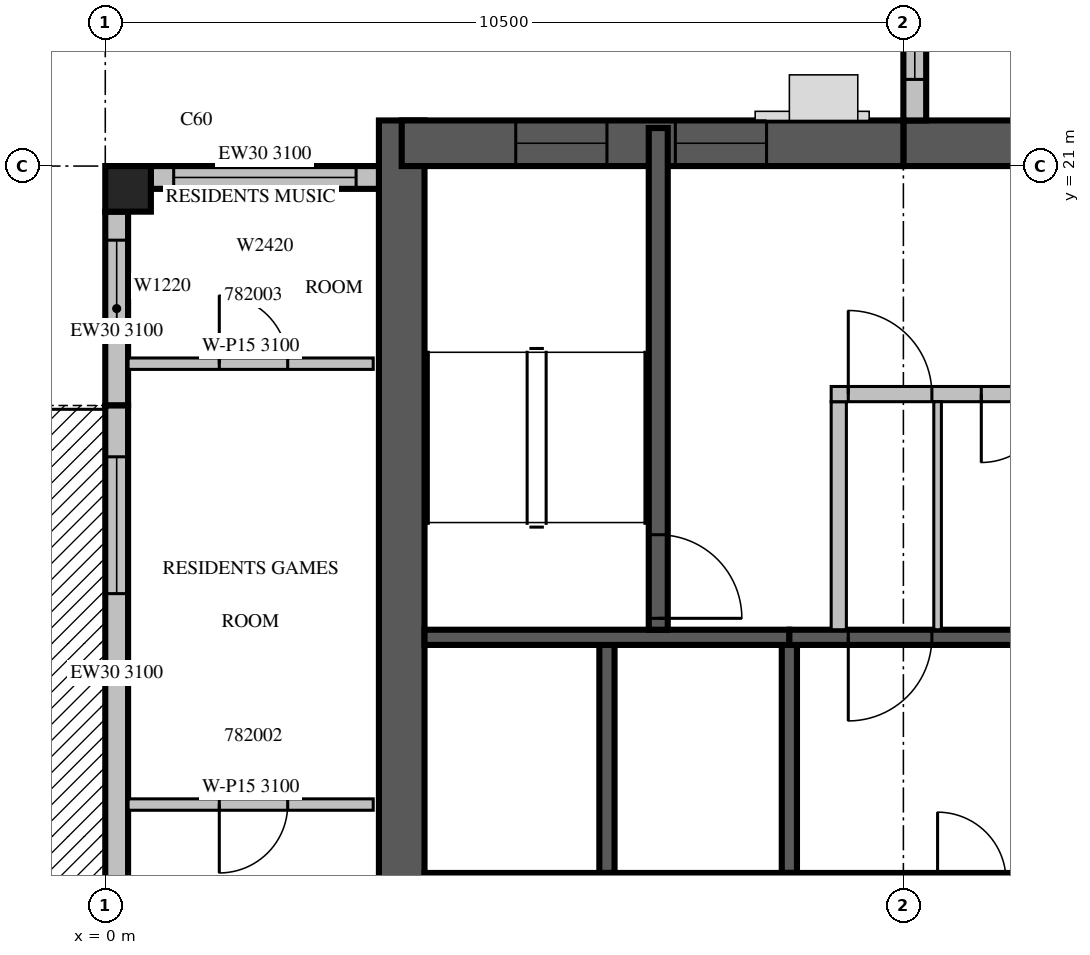
"""IFC4 building model, lengths in metres.
Left out: names, types, materials, properties, quantities, classifications, styles, units other than length and angle.
Written with IfcOpenShell. Run it as: python <this file> out.ifc"""

import sys

from ifc_helpers import new_model, si_unit, direction, frame, frame_2d, origin, origin_2d, place, context, subcontext, project, spatial, rectangle, extrude, source, transform, mapped, element, fill, save


model = new_model("IFC4")
c1 = context("Model", 3, precision=1e-05, world=origin(), true_north=direction((0.0, 1.0)))
c2 = subcontext(c1, "Body", "Model", "MODEL_VIEW")
j1 = project(units=[si_unit("LENGTHUNIT", "METRE"), si_unit("PLANEANGLEUNIT", "RADIAN")], contexts=[c1])
p1 = place(None, origin())
s1 = spatial("IfcSite", under=j1, at=p1, CompositionType="ELEMENT")
p2 = place(p1, origin())
s2 = spatial("IfcBuilding", under=s1, at=p2, CompositionType="ELEMENT")
p3 = place(p2, frame((0.0, 0.0, 347.5)))
s3 = spatial("IfcBuildingStorey", under=s2, at=p3, CompositionType="ELEMENT", Elevation=347.5)
m1 = source(origin(), c2, "Body", "SweptSolid", [
    extrude(rectangle(XDim=0.6, YDim=0.6, at=origin_2d()), origin(), (0.0, 0.0, 1.0), 3.5),
])
p4 = place(p3, frame((0.3, 20.7, 0.0), z_axis=(0.0, 0.0, 1.0), x_axis=(1.0, 0.0, 0.0)))
e1 = element("IfcColumn", 1, at=p4, inside=s3, PredefinedType="COLUMN", context=c2, shape_type="MappedRepresentation", body=[
    mapped(m1, transform((0.0, 0.0, 0.0), scale=1.0)),
])
m2 = source(origin(), c2, "Body", "SweptSolid", [
    extrude(rectangle(XDim=17.4, YDim=0.6, at=frame_2d((8.7, 0.0))), origin(), (0.0, 0.0, 1.0), 3.5),
])
p5 = place(p3, frame((3.9, 4.2, 0.0), z_axis=(0.0, 0.0, 1.0), x_axis=(0.0, 1.0, 0.0)))
e2 = element("IfcWall", 2, at=p5, inside=s3, PredefinedType="SHEAR", context=c2, shape_type="MappedRepresentation", body=[
    mapped(m2, transform((0.0, 0.0, 0.0), scale=1.0)),
])
m3 = source(origin(), c2, "Body", "SweptSolid", [
    extrude(rectangle(XDim=2.2, YDim=2.1, at=frame_2d((1.1, 1.05))), frame((0.0, 0.31, 0.0), z_axis=(0.0, -1.0, 0.0), x_axis=(1.0, 0.0, 0.0)), (0.0, 0.0, 1.0), 0.62),
])
p6 = place(p5, frame((4.2, 0.0, 0.0)))
e3 = element("IfcOpeningElement", 3, at=p6, cuts=e2, PredefinedType="OPENING", context=c2, shape_type="MappedRepresentation", body=[
    mapped(m3, transform((0.0, 0.0, 0.0), scale=1.0)),
])
m4 = source(origin(), c2, "Body", "SweptSolid", [
    extrude(rectangle(XDim=11.1, YDim=0.6, at=frame_2d((5.55, 0.0))), origin(), (0.0, 0.0, 1.0), 3.5),
])
p7 = place(p3, frame((10.5, 21.3, 0.0), z_axis=(0.0, 0.0, 1.0), x_axis=(1.0, 0.0, 0.0)))
e4 = element("IfcWall", 4, at=p7, inside=s3, PredefinedType="SHEAR", context=c2, shape_type="MappedRepresentation", body=[
    mapped(m4, transform((0.0, 0.0, 0.0), scale=1.0)),
])
m5 = source(origin(), c2, "Body", "SweptSolid", [
    extrude(rectangle(XDim=1.2, YDim=2.1, at=frame_2d((0.6, 1.05))), frame((0.0, 0.31, 0.0), z_axis=(0.0, -1.0, 0.0), x_axis=(1.0, 0.0, 0.0)), (0.0, 0.0, 1.0), 0.62),
])
p8 = place(p7, frame((8.7, 0.0, 0.0)))
e5 = element("IfcOpeningElement", 5, at=p8, cuts=e4, PredefinedType="OPENING", context=c2, shape_type="MappedRepresentation", body=[
    mapped(m5, transform((0.0, 0.0, 0.0), scale=1.0)),
])
m6 = source(origin(), c2, "Body", "SweptSolid", [
    extrude(rectangle(XDim=6.6, YDim=0.6, at=frame_2d((3.3, 0.0))), origin(), (0.0, 0.0, 1.0), 3.5),
])
p9 = place(p3, frame((3.9, 21.3, 0.0), z_axis=(0.0, 0.0, 1.0), x_axis=(1.0, 0.0, 0.0)))
e6 = element("IfcWall", 6, at=p9, inside=s3, PredefinedType="SHEAR", context=c2, shape_type="MappedRepresentation", body=[
    mapped(m6, transform((0.0, 0.0, 0.0), scale=1.0)),
])
m7 = source(origin(), c2, "Body", "SweptSolid", [
    extrude(rectangle(XDim=1.2, YDim=2.4, at=frame_2d((0.6, 1.2))), frame((0.0, 0.31, 0.0), z_axis=(0.0, -1.0, 0.0), x_axis=(1.0, 0.0, 0.0)), (0.0, 0.0, 1.0), 0.62),
])
p10 = place(p9, frame((1.5, 0.0, 0.6)))
e7 = element("IfcOpeningElement", 7, at=p10, cuts=e6, PredefinedType="OPENING", context=c2, shape_type="MappedRepresentation", body=[
    mapped(m7, transform((0.0, 0.0, 0.0), scale=1.0)),
])
p11 = place(p9, frame((3.6, 0.0, 0.6)))
e8 = element("IfcOpeningElement", 8, at=p11, cuts=e6, PredefinedType="OPENING", context=c2, shape_type="MappedRepresentation", body=[
    mapped(m7, transform((0.0, 0.0, 0.0), scale=1.0)),
])
m8 = source(origin(), c2, "Body", "SweptSolid", [
    extrude(rectangle(XDim=7.5, YDim=0.3, at=frame_2d((3.75, 0.0))), origin(), (0.0, 0.0, 1.0), 3.1),
])
p12 = place(p3, frame((10.65, 29.1, 0.0), z_axis=(0.0, 0.0, 1.0), x_axis=(0.0, -1.0, 0.0)))
e9 = element("IfcWall", 9, at=p12, inside=s3, PredefinedType="STANDARD", context=c2, shape_type="MappedRepresentation", body=[
    mapped(m8, transform((0.0, 0.0, 0.0), scale=1.0)),
])
m9 = source(origin(), c2, "Body", "SweptSolid", [
    extrude(rectangle(XDim=3.6, YDim=2.0, at=frame_2d((1.8, 1.0))), frame((0.0, 0.16, 0.0), z_axis=(0.0, -1.0, 0.0), x_axis=(1.0, 0.0, 0.0)), (0.0, 0.0, 1.0), 0.32),
])
p13 = place(p12, frame((3.36, 0.0, 0.6)))
e10 = element("IfcOpeningElement", 10, at=p13, cuts=e9, PredefinedType="OPENING", context=c2, shape_type="MappedRepresentation", body=[
    mapped(m9, transform((0.0, 0.0, 0.0), scale=1.0)),
])
m10 = source(origin(), c2, "Body", "SweptSolid", [
    extrude(rectangle(XDim=2.4, YDim=2.0, at=frame_2d((1.2, 1.0))), frame((0.0, 0.16, 0.0), z_axis=(0.0, -1.0, 0.0), x_axis=(1.0, 0.0, 0.0)), (0.0, 0.0, 1.0), 0.32),
])
p14 = place(p12, frame((0.48, 0.0, 0.6)))
e11 = element("IfcOpeningElement", 11, at=p14, cuts=e9, PredefinedType="OPENING", context=c2, shape_type="MappedRepresentation", body=[
    mapped(m10, transform((0.0, 0.0, 0.0), scale=1.0)),
])
m11 = source(origin(), c2, "Body", "SweptSolid", [
    extrude(rectangle(XDim=3.0, YDim=0.3, at=frame_2d((1.5, 0.0))), origin(), (0.0, 0.0, 1.0), 3.1),
])
p15 = place(p3, frame((3.6, 20.85, 0.0), z_axis=(0.0, 0.0, 1.0), x_axis=(-1.0, 0.0, 0.0)))
e12 = element("IfcWall", 12, at=p15, inside=s3, PredefinedType="STANDARD", context=c2, shape_type="MappedRepresentation", body=[
    mapped(m11, transform((0.0, 0.0, 0.0), scale=1.0)),
])
p16 = place(p15, frame((0.3, 0.0, 0.6)))
e13 = element("IfcOpeningElement", 13, at=p16, cuts=e12, PredefinedType="OPENING", context=c2, shape_type="MappedRepresentation", body=[
    mapped(m10, transform((0.0, 0.0, 0.0), scale=1.0)),
])
m12 = source(origin(), c2, "Body", "SweptSolid", [
    extrude(rectangle(XDim=2.55, YDim=0.3, at=frame_2d((1.275, 0.0))), origin(), (0.0, 0.0, 1.0), 3.1),
])
p17 = place(p3, frame((0.15, 20.4, 0.0), z_axis=(0.0, 0.0, 1.0), x_axis=(0.0, -1.0, 0.0)))
e14 = element("IfcWall", 14, at=p17, inside=s3, PredefinedType="STANDARD", context=c2, shape_type="MappedRepresentation", body=[
    mapped(m12, transform((0.0, 0.0, 0.0), scale=1.0)),
])
m13 = source(origin(), c2, "Body", "SweptSolid", [
    extrude(rectangle(XDim=1.2, YDim=2.0, at=frame_2d((0.6, 1.0))), frame((0.0, 0.16, 0.0), z_axis=(0.0, -1.0, 0.0), x_axis=(1.0, 0.0, 0.0)), (0.0, 0.0, 1.0), 0.32),
])
p18 = place(p17, frame((0.375, 0.0, 0.6)))
e15 = element("IfcOpeningElement", 15, at=p18, cuts=e14, PredefinedType="OPENING", context=c2, shape_type="MappedRepresentation", body=[
    mapped(m13, transform((0.0, 0.0, 0.0), scale=1.0)),
])
m14 = source(origin(), c2, "Body", "SweptSolid", [
    extrude(rectangle(XDim=7.05, YDim=0.3, at=frame_2d((3.525, 0.0))), origin(), (0.0, 0.0, 1.0), 3.1),
])
p19 = place(p3, frame((0.15, 17.85, 0.0), z_axis=(0.0, 0.0, 1.0), x_axis=(0.0, -1.0, 0.0)))
e16 = element("IfcWall", 16, at=p19, inside=s3, PredefinedType="STANDARD", context=c2, shape_type="MappedRepresentation", body=[
    mapped(m14, transform((0.0, 0.0, 0.0), scale=1.0)),
])
m15 = source(origin(), c2, "Body", "SweptSolid", [
    extrude(rectangle(XDim=1.8, YDim=2.4, at=frame_2d((0.9, 1.2))), frame((0.0, 0.16, 0.0), z_axis=(0.0, -1.0, 0.0), x_axis=(1.0, 0.0, 0.0)), (0.0, 0.0, 1.0), 0.32),
])
p20 = place(p19, frame((0.675, 0.0, 0.0)))
e17 = element("IfcOpeningElement", 17, at=p20, cuts=e16, PredefinedType="OPENING", context=c2, shape_type="MappedRepresentation", body=[
    mapped(m15, transform((0.0, 0.0, 0.0), scale=1.0)),
])
m16 = source(origin(), c2, "Body", "SweptSolid", [
    extrude(rectangle(XDim=3.0, YDim=0.2, at=frame_2d((1.5, 0.0))), origin(), (0.0, 0.0, 1.0), 3.5),
])
p21 = place(p3, frame((6.6, 11.7, 0.0), z_axis=(0.0, 0.0, 1.0), x_axis=(0.0, 1.0, 0.0)))
e18 = element("IfcWall", 18, at=p21, inside=s3, PredefinedType="SOLIDWALL", context=c2, shape_type="MappedRepresentation", body=[
    mapped(m16, transform((0.0, 0.0, 0.0), scale=1.0)),
])
m17 = source(origin(), c2, "Body", "SweptSolid", [
    extrude(rectangle(XDim=3.0, YDim=0.2, at=frame_2d((1.5, 0.0))), origin(), (0.0, 0.0, 1.0), 3.1),
])
p22 = place(p3, frame((9.0, 11.7, 0.0), z_axis=(0.0, 0.0, 1.0), x_axis=(0.0, 1.0, 0.0)))
e19 = element("IfcWall", 19, at=p22, inside=s3, PredefinedType="SOLIDWALL", context=c2, shape_type="MappedRepresentation", body=[
    mapped(m17, transform((0.0, 0.0, 0.0), scale=1.0)),
])
m18 = source(origin(), c2, "Body", "SweptSolid", [
    extrude(rectangle(XDim=4.8, YDim=0.2, at=frame_2d((2.4, 0.0))), origin(), (0.0, 0.0, 1.0), 3.5),
])
p23 = place(p3, frame((4.2, 11.6, 0.0), z_axis=(0.0, 0.0, 1.0), x_axis=(1.0, 0.0, 0.0)))
e20 = element("IfcWall", 20, at=p23, inside=s3, PredefinedType="SOLIDWALL", context=c2, shape_type="MappedRepresentation", body=[
    mapped(m18, transform((0.0, 0.0, 0.0), scale=1.0)),
])
m19 = source(origin(), c2, "Body", "SweptSolid", [
    extrude(rectangle(XDim=1.1, YDim=2.1, at=frame_2d((0.55, 1.05))), frame((0.0, 0.11, 0.0), z_axis=(0.0, -1.0, 0.0), x_axis=(1.0, 0.0, 0.0)), (0.0, 0.0, 1.0), 0.22),
])
p24 = place(p23, frame((0.65, 0.0, 0.0)))
e21 = element("IfcOpeningElement", 21, at=p24, cuts=e20, PredefinedType="OPENING", context=c2, shape_type="MappedRepresentation", body=[
    mapped(m19, transform((0.0, 0.0, 0.0), scale=1.0)),
])
p25 = place(p23, frame((3.05, 0.0, 0.0)))
e22 = element("IfcOpeningElement", 22, at=p25, cuts=e20, PredefinedType="OPENING", context=c2, shape_type="MappedRepresentation", body=[
    mapped(m19, transform((0.0, 0.0, 0.0), scale=1.0)),
])
m20 = source(origin(), c2, "Body", "SweptSolid", [
    extrude(rectangle(XDim=4.8, YDim=0.2, at=frame_2d((2.4, 0.0))), origin(), (0.0, 0.0, 1.0), 3.1),
])
p26 = place(p3, frame((9.0, 11.6, 0.0), z_axis=(0.0, 0.0, 1.0), x_axis=(1.0, 0.0, 0.0)))
e23 = element("IfcWall", 23, at=p26, inside=s3, PredefinedType="SOLIDWALL", context=c2, shape_type="MappedRepresentation", body=[
    mapped(m20, transform((0.0, 0.0, 0.0), scale=1.0)),
])
m21 = source(origin(), c2, "Body", "SweptSolid", [
    extrude(rectangle(XDim=0.9, YDim=2.1, at=frame_2d((0.45, 1.05))), frame((0.0, 0.11, 0.0), z_axis=(0.0, -1.0, 0.0), x_axis=(1.0, 0.0, 0.0)), (0.0, 0.0, 1.0), 0.22),
])
p27 = place(p26, frame((1.95, 0.0, 0.0)))
e24 = element("IfcOpeningElement", 24, at=p27, cuts=e23, PredefinedType="OPENING", context=c2, shape_type="MappedRepresentation", body=[
    mapped(m21, transform((0.0, 0.0, 0.0), scale=1.0)),
])
p28 = place(p3, frame((4.2, 14.8, 0.0), z_axis=(0.0, 0.0, 1.0), x_axis=(1.0, 0.0, 0.0)))
e25 = element("IfcWall", 25, at=p28, inside=s3, PredefinedType="SOLIDWALL", context=c2, shape_type="MappedRepresentation", body=[
    mapped(m18, transform((0.0, 0.0, 0.0), scale=1.0)),
])
p29 = place(p3, frame((9.0, 14.8, 0.0), z_axis=(0.0, 0.0, 1.0), x_axis=(1.0, 0.0, 0.0)))
e26 = element("IfcWall", 26, at=p29, inside=s3, PredefinedType="SOLIDWALL", context=c2, shape_type="MappedRepresentation", body=[
    mapped(m20, transform((0.0, 0.0, 0.0), scale=1.0)),
])
p30 = place(p29, frame((0.775, 0.0, 0.0)))
e27 = element("IfcOpeningElement", 27, at=p30, cuts=e26, PredefinedType="OPENING", context=c2, shape_type="MappedRepresentation", body=[
    mapped(m19, transform((0.0, 0.0, 0.0), scale=1.0)),
])
m22 = source(origin(), c2, "Body", "SweptSolid", [
    extrude(rectangle(XDim=6.6, YDim=0.25, at=frame_2d((3.3, 0.0))), origin(), (0.0, 0.0, 1.0), 3.1),
])
p31 = place(p3, frame((7.275, 14.9, 0.0), z_axis=(0.0, 0.0, 1.0), x_axis=(0.0, 1.0, 0.0)))
e28 = element("IfcWall", 28, at=p31, inside=s3, PredefinedType="SOLIDWALL", context=c2, shape_type="MappedRepresentation", body=[
    mapped(m22, transform((0.0, 0.0, 0.0), scale=1.0)),
])
m23 = source(origin(), c2, "Body", "SweptSolid", [
    extrude(rectangle(XDim=1.1, YDim=2.1, at=frame_2d((0.55, 1.05))), frame((0.0, 0.135, 0.0), z_axis=(0.0, -1.0, 0.0), x_axis=(1.0, 0.0, 0.0)), (0.0, 0.0, 1.0), 0.27),
])
p32 = place(p31, frame((0.15, 0.0, 0.0)))
e29 = element("IfcOpeningElement", 29, at=p32, cuts=e28, PredefinedType="OPENING", context=c2, shape_type="MappedRepresentation", body=[
    mapped(m23, transform((0.0, 0.0, 0.0), scale=1.0)),
])
m24 = source(origin(), c2, "Body", "SweptSolid", [
    extrude(rectangle(XDim=3.0, YDim=0.2, at=frame_2d((1.5, 0.0))), origin(), (0.0, 0.0, 1.0), 3.1),
])
p33 = place(p3, frame((9.65, 14.9, 0.0), z_axis=(0.0, 0.0, 1.0), x_axis=(0.0, 1.0, 0.0)))
e30 = element("IfcWall", 30, at=p33, inside=s3, PredefinedType="PARTITIONING", context=c2, shape_type="MappedRepresentation", body=[
    mapped(m24, transform((0.0, 0.0, 0.0), scale=1.0)),
])
m25 = source(origin(), c2, "Body", "SweptSolid", [
    extrude(rectangle(XDim=11.45, YDim=0.2, at=frame_2d((5.725, 0.0))), origin(), (0.0, 0.0, 1.0), 3.1),
])
p34 = place(p3, frame((9.55, 18.0, 0.0), z_axis=(0.0, 0.0, 1.0), x_axis=(1.0, 0.0, 0.0)))
e31 = element("IfcWall", 31, at=p34, inside=s3, PredefinedType="PARTITIONING", context=c2, shape_type="MappedRepresentation", body=[
    mapped(m25, transform((0.0, 0.0, 0.0), scale=1.0)),
])
p35 = place(p34, frame((0.225, 0.0, 0.0)))
e32 = element("IfcOpeningElement", 32, at=p35, cuts=e31, PredefinedType="OPENING", context=c2, shape_type="MappedRepresentation", body=[
    mapped(m19, transform((0.0, 0.0, 0.0), scale=1.0)),
])
p36 = place(p34, frame((1.975, 0.0, 0.0)))
e33 = element("IfcOpeningElement", 33, at=p36, cuts=e31, PredefinedType="OPENING", context=c2, shape_type="MappedRepresentation", body=[
    mapped(m21, transform((0.0, 0.0, 0.0), scale=1.0)),
])
p37 = place(p34, frame((7.35, 0.0, 0.0)))
e34 = element("IfcOpeningElement", 34, at=p37, cuts=e31, PredefinedType="OPENING", context=c2, shape_type="MappedRepresentation", body=[
    mapped(m19, transform((0.0, 0.0, 0.0), scale=1.0)),
])
m26 = source(origin(), c2, "Body", "SweptSolid", [
    extrude(rectangle(XDim=3.0, YDim=0.1, at=frame_2d((1.5, 0.0))), origin(), (0.0, 0.0, 1.0), 3.1),
])
p38 = place(p3, frame((10.95, 14.9, 0.0), z_axis=(0.0, 0.0, 1.0), x_axis=(0.0, 1.0, 0.0)))
e35 = element("IfcWall", 35, at=p38, inside=s3, PredefinedType="PARTITIONING", context=c2, shape_type="MappedRepresentation", body=[
    mapped(m26, transform((0.0, 0.0, 0.0), scale=1.0)),
])
m27 = source(origin(), c2, "Body", "SweptSolid", [
    extrude(rectangle(XDim=3.225, YDim=0.15, at=frame_2d((1.613, 0.0))), origin(), (0.0, 0.0, 1.0), 3.1),
])
p39 = place(p3, frame((0.3, 12.6, 0.0), z_axis=(0.0, 0.0, 1.0), x_axis=(1.0, 0.0, 0.0)))
e36 = element("IfcWall", 36, at=p39, inside=s3, PredefinedType="PARTITIONING", context=c2, shape_type="MappedRepresentation", body=[
    mapped(m27, transform((0.0, 0.0, 0.0), scale=1.0)),
])
m28 = source(origin(), c2, "Body", "SweptSolid", [
    extrude(rectangle(XDim=0.9, YDim=2.1, at=frame_2d((0.45, 1.05))), frame((0.0, 0.085, 0.0), z_axis=(0.0, -1.0, 0.0), x_axis=(1.0, 0.0, 0.0)), (0.0, 0.0, 1.0), 0.17),
])
p40 = place(p39, frame((1.2, 0.0, 0.0)))
e37 = element("IfcOpeningElement", 37, at=p40, cuts=e36, PredefinedType="OPENING", context=c2, shape_type="MappedRepresentation", body=[
    mapped(m28, transform((0.0, 0.0, 0.0), scale=1.0)),
])
p41 = place(p3, frame((0.3, 18.4, 0.0), z_axis=(0.0, 0.0, 1.0), x_axis=(1.0, 0.0, 0.0)))
e38 = element("IfcWall", 38, at=p41, inside=s3, PredefinedType="PARTITIONING", context=c2, shape_type="MappedRepresentation", body=[
    mapped(m27, transform((0.0, 0.0, 0.0), scale=1.0)),
])
p42 = place(p41, frame((1.2, 0.0, 0.0)))
e39 = element("IfcOpeningElement", 39, at=p42, cuts=e38, PredefinedType="OPENING", context=c2, shape_type="MappedRepresentation", body=[
    mapped(m28, transform((0.0, 0.0, 0.0), scale=1.0)),
])
m29 = source(origin(), c2, "Body", "SweptSolid", [
    extrude(rectangle(XDim=3.6, YDim=2.0, at=frame_2d((1.8, 1.0))), frame((0.0, 0.03, 0.0), z_axis=(0.0, -1.0, 0.0), x_axis=(1.0, 0.0, 0.0)), (0.0, 0.0, 1.0), 0.06),
])
p43 = place(p13, origin())
e40 = element("IfcWindow", 40, at=p43, inside=s3, PartitioningType="SINGLE_PANEL", PredefinedType="WINDOW", context=c2, shape_type="MappedRepresentation", body=[
    mapped(m29, transform((0.0, 0.0, 0.0), scale=1.0)),
])
fill(e10, e40)
m30 = source(origin(), c2, "Body", "SweptSolid", [
    extrude(rectangle(XDim=2.4, YDim=2.0, at=frame_2d((1.2, 1.0))), frame((0.0, 0.03, 0.0), z_axis=(0.0, -1.0, 0.0), x_axis=(1.0, 0.0, 0.0)), (0.0, 0.0, 1.0), 0.06),
])
p44 = place(p16, origin())
e41 = element("IfcWindow", 41, at=p44, inside=s3, PartitioningType="SINGLE_PANEL", PredefinedType="WINDOW", context=c2, shape_type="MappedRepresentation", body=[
    mapped(m30, transform((0.0, 0.0, 0.0), scale=1.0)),
])
fill(e13, e41)
m31 = source(origin(), c2, "Body", "SweptSolid", [
    extrude(rectangle(XDim=1.2, YDim=2.0, at=frame_2d((0.6, 1.0))), frame((0.0, 0.03, 0.0), z_axis=(0.0, -1.0, 0.0), x_axis=(1.0, 0.0, 0.0)), (0.0, 0.0, 1.0), 0.06),
])
p45 = place(p18, origin())
e42 = element("IfcWindow", 42, at=p45, inside=s3, PartitioningType="SINGLE_PANEL", PredefinedType="WINDOW", context=c2, shape_type="MappedRepresentation", body=[
    mapped(m31, transform((0.0, 0.0, 0.0), scale=1.0)),
])
fill(e15, e42)
m32 = source(origin(), c2, "Body", "SweptSolid", [
    extrude(rectangle(XDim=1.8, YDim=2.4, at=frame_2d((0.9, 1.2))), frame((0.0, 0.025, 0.0), z_axis=(0.0, -1.0, 0.0), x_axis=(1.0, 0.0, 0.0)), (0.0, 0.0, 1.0), 0.05),
])
p46 = place(p20, origin())
e43 = element("IfcDoor", 43, at=p46, inside=s3, OperationType="SLIDING_TO_LEFT", PredefinedType="DOOR", context=c2, shape_type="MappedRepresentation", body=[
    mapped(m32, transform((0.0, 0.0, 0.0), scale=1.0)),
])
fill(e17, e43)
m33 = source(origin(), c2, "Body", "SweptSolid", [
    extrude(rectangle(XDim=1.1, YDim=2.1, at=frame_2d((0.55, 1.05))), frame((0.0, 0.025, 0.0), z_axis=(0.0, -1.0, 0.0), x_axis=(1.0, 0.0, 0.0)), (0.0, 0.0, 1.0), 0.05),
])
p47 = place(p30, origin())
e44 = element("IfcDoor", 44, at=p47, inside=s3, OperationType="SINGLE_SWING_RIGHT", PredefinedType="DOOR", context=c2, shape_type="MappedRepresentation", body=[
    mapped(m33, transform((0.0, 0.0, 0.0), scale=1.0)),
])
fill(e27, e44)
p48 = place(p32, origin())
e45 = element("IfcDoor", 45, at=p48, inside=s3, OperationType="SINGLE_SWING_RIGHT", PredefinedType="DOOR", context=c2, shape_type="MappedRepresentation", body=[
    mapped(m33, transform((0.0, 0.0, 0.0), scale=1.0)),
])
fill(e29, e45)
p49 = place(p35, origin())
e46 = element("IfcDoor", 46, at=p49, inside=s3, OperationType="SINGLE_SWING_LEFT", PredefinedType="DOOR", context=c2, shape_type="MappedRepresentation", body=[
    mapped(m33, transform((0.0, 0.0, 0.0), scale=1.0)),
])
fill(e32, e46)
m34 = source(origin(), c2, "Body", "SweptSolid", [
    extrude(rectangle(XDim=0.9, YDim=2.1, at=frame_2d((0.45, 1.05))), frame((0.0, 0.025, 0.0), z_axis=(0.0, -1.0, 0.0), x_axis=(1.0, 0.0, 0.0)), (0.0, 0.0, 1.0), 0.05),
])
p50 = place(p36, origin())
e47 = element("IfcDoor", 47, at=p50, inside=s3, OperationType="SINGLE_SWING_RIGHT", PredefinedType="DOOR", context=c2, shape_type="MappedRepresentation", body=[
    mapped(m34, transform((0.0, 0.0, 0.0), scale=1.0)),
])
fill(e33, e47)
m35 = source(origin(), c2, "Body", "SweptSolid", [
    extrude(rectangle(XDim=1.2, YDim=2.4, at=frame_2d((0.6, 1.2))), frame((0.0, 0.03, 0.0), z_axis=(0.0, -1.0, 0.0), x_axis=(1.0, 0.0, 0.0)), (0.0, 0.0, 1.0), 0.06),
])
p51 = place(p10, origin())
e48 = element("IfcWindow", 48, at=p51, inside=s3, PartitioningType="SINGLE_PANEL", PredefinedType="WINDOW", context=c2, shape_type="MappedRepresentation", body=[
    mapped(m35, transform((0.0, 0.0, 0.0), scale=1.0)),
])
fill(e7, e48)
p52 = place(p11, origin())
e49 = element("IfcWindow", 49, at=p52, inside=s3, PartitioningType="SINGLE_PANEL", PredefinedType="WINDOW", context=c2, shape_type="MappedRepresentation", body=[
    mapped(m35, transform((0.0, 0.0, 0.0), scale=1.0)),
])
fill(e8, e49)
p53 = place(p40, origin())
e50 = element("IfcDoor", 50, at=p53, inside=s3, OperationType="SINGLE_SWING_RIGHT", PredefinedType="DOOR", context=c2, shape_type="MappedRepresentation", body=[
    mapped(m34, transform((0.0, 0.0, 0.0), scale=1.0)),
])
fill(e37, e50)
p54 = place(p42, origin())
e51 = element("IfcDoor", 51, at=p54, inside=s3, OperationType="SINGLE_SWING_LEFT", PredefinedType="DOOR", context=c2, shape_type="MappedRepresentation", body=[
    mapped(m34, transform((0.0, 0.0, 0.0), scale=1.0)),
])
fill(e39, e51)
save(model, sys.argv[1])
